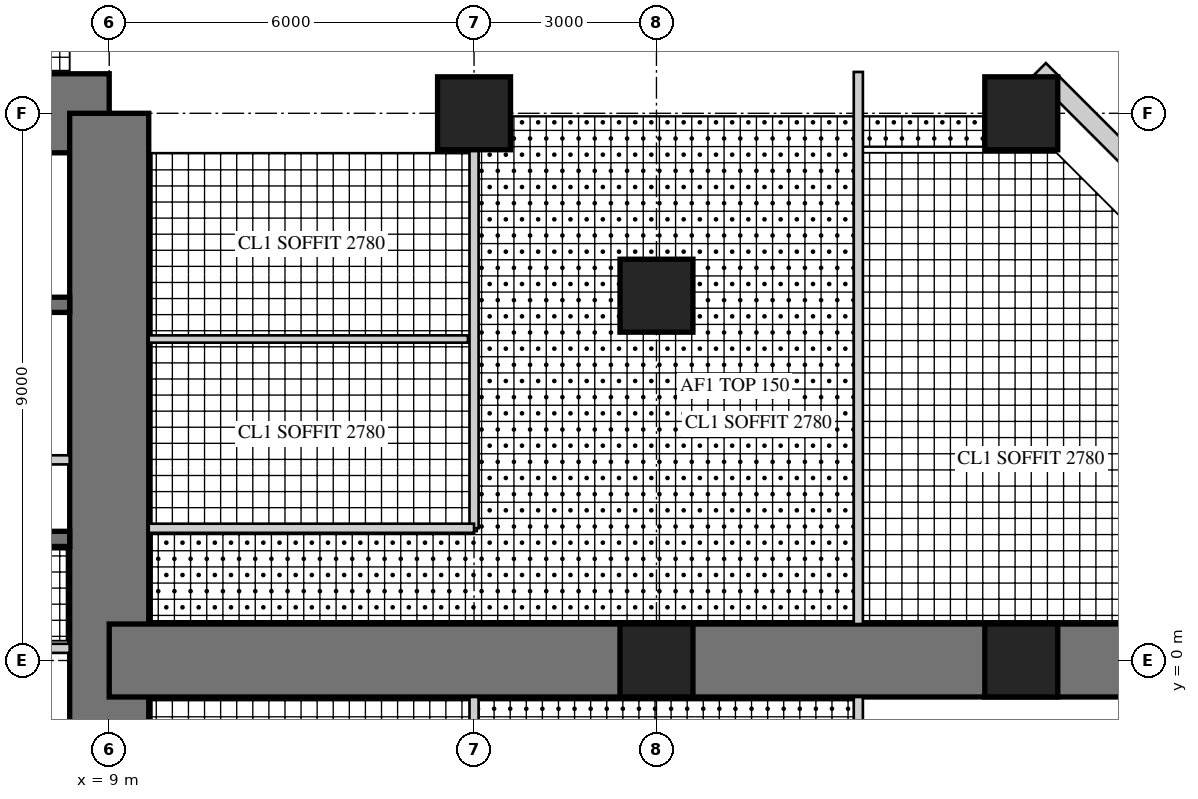
"""IFC4 building model, lengths in metres.
Left out: names, types, materials, properties, quantities, classifications, styles, units other than length and angle.
Written with IfcOpenShell. Run it as: python <this file> out.ifc"""

import sys

from ifc_helpers import new_model, si_unit, direction, frame, frame_2d, origin, origin_2d, place, context, subcontext, project, spatial, rectangle, extrude, element, fill, save


model = new_model("IFC4")
c1 = context("Model", 3, precision=1e-05, world=origin(), true_north=direction((0.0, 1.0)))
c2 = subcontext(c1, "Body", "Model", "MODEL_VIEW")
j1 = project(units=[si_unit("LENGTHUNIT", "METRE"), si_unit("PLANEANGLEUNIT", "RADIAN")], contexts=[c1])
p1 = place(None, origin())
s1 = spatial("IfcSite", under=j1, at=p1, CompositionType="ELEMENT")
p2 = place(p1, origin())
s2 = spatial("IfcBuilding", under=s1, at=p2, CompositionType="ELEMENT")
p3 = place(p2, frame((0.0, 0.0, 47.5)))
s3 = spatial("IfcBuildingStorey", under=s2, at=p3, CompositionType="ELEMENT", Elevation=47.5)
p4 = place(p3, frame((9.0, 9.0, 0.0), z_axis=(0.0, 0.0, 1.0), x_axis=(-1.0, 0.0, 0.0)))
e1 = element("IfcWall", 1, at=p4, inside=s3, PredefinedType="SHEAR", context=c2, shape_type="SweptSolid", body=[
    extrude(rectangle(XDim=18.0, YDim=1.3, at=frame_2d((9.0, 0.0))), origin(), (0.0, 0.0, 1.0), 4.0),
])
p5 = place(p4, frame((9.8, 0.0, 0.0)))
e2 = element("IfcOpeningElement", 2, at=p5, cuts=e1, PredefinedType="OPENING", context=c2, shape_type="SweptSolid", body=[
    extrude(rectangle(XDim=1.0, YDim=2.4, at=frame_2d((0.5, 1.2))), frame((0.0, 0.66, 0.0), z_axis=(0.0, -1.0, 0.0), x_axis=(1.0, 0.0, 0.0)), (0.0, 0.0, 1.0), 1.32),
])
p6 = place(p3, frame((9.0, -9.0, 0.0), z_axis=(0.0, 0.0, 1.0), x_axis=(0.0, 1.0, 0.0)))
e3 = element("IfcWall", 3, at=p6, inside=s3, PredefinedType="SHEAR", context=c2, shape_type="SweptSolid", body=[
    extrude(rectangle(XDim=18.0, YDim=1.3, at=frame_2d((9.0, 0.0))), origin(), (0.0, 0.0, 1.0), 4.0),
])
p7 = place(p6, frame((9.8, 0.0, 0.0)))
e4 = element("IfcOpeningElement", 4, at=p7, cuts=e3, PredefinedType="OPENING", context=c2, shape_type="SweptSolid", body=[
    extrude(rectangle(XDim=1.0, YDim=2.4, at=frame_2d((0.5, 1.2))), frame((0.0, 0.66, 0.0), z_axis=(0.0, -1.0, 0.0), x_axis=(1.0, 0.0, 0.0)), (0.0, 0.0, 1.0), 1.32),
])
p8 = place(p3, frame((1.925, 2.0, 0.0), z_axis=(0.0, 0.0, 1.0), x_axis=(1.0, 0.0, 0.0)))
e5 = element("IfcWall", 5, at=p8, inside=s3, PredefinedType="SHEAR", context=c2, shape_type="SweptSolid", body=[
    extrude(rectangle(XDim=6.425, YDim=0.25, at=frame_2d((3.212, 0.0))), origin(), (0.0, 0.0, 1.0), 4.0),
])
p9 = place(p3, frame((1.925, 5.85, 0.0), z_axis=(0.0, 0.0, 1.0), x_axis=(1.0, 0.0, 0.0)))
e6 = element("IfcWall", 6, at=p9, inside=s3, PredefinedType="SHEAR", context=c2, shape_type="SweptSolid", body=[
    extrude(rectangle(XDim=6.425, YDim=0.25, at=frame_2d((3.212, 0.0))), origin(), (0.0, 0.0, 1.0), 4.0),
])
p10 = place(p9, frame((0.454, 0.0, 0.0)))
e7 = element("IfcOpeningElement", 7, at=p10, cuts=e6, PredefinedType="OPENING", context=c2, shape_type="SweptSolid", body=[
    extrude(rectangle(XDim=1.1, YDim=2.2, at=frame_2d((0.55, 1.1))), frame((0.0, 0.135, 0.0), z_axis=(0.0, -1.0, 0.0), x_axis=(1.0, 0.0, 0.0)), (0.0, 0.0, 1.0), 0.27),
])
p11 = place(p9, frame((2.663, 0.0, 0.0)))
e8 = element("IfcOpeningElement", 8, at=p11, cuts=e6, PredefinedType="OPENING", context=c2, shape_type="SweptSolid", body=[
    extrude(rectangle(XDim=1.1, YDim=2.2, at=frame_2d((0.55, 1.1))), frame((0.0, 0.135, 0.0), z_axis=(0.0, -1.0, 0.0), x_axis=(1.0, 0.0, 0.0)), (0.0, 0.0, 1.0), 0.27),
])
p12 = place(p9, frame((4.871, 0.0, 0.0)))
e9 = element("IfcOpeningElement", 9, at=p12, cuts=e6, PredefinedType="OPENING", context=c2, shape_type="SweptSolid", body=[
    extrude(rectangle(XDim=1.1, YDim=2.2, at=frame_2d((0.55, 1.1))), frame((0.0, 0.135, 0.0), z_axis=(0.0, -1.0, 0.0), x_axis=(1.0, 0.0, 0.0)), (0.0, 0.0, 1.0), 0.27),
])
p13 = place(p3, frame((1.925, 3.3, 0.0), z_axis=(0.0, 0.0, 1.0), x_axis=(1.0, 0.0, 0.0)))
e10 = element("IfcWall", 10, at=p13, inside=s3, PredefinedType="PARTITIONING", context=c2, shape_type="SweptSolid", body=[
    extrude(rectangle(XDim=6.425, YDim=0.15, at=frame_2d((3.212, 0.0))), origin(), (0.0, 0.0, 1.0), 4.0),
])
p14 = place(p13, frame((0.075, 0.0, 0.0)))
e11 = element("IfcOpeningElement", 11, at=p14, cuts=e10, PredefinedType="OPENING", context=c2, shape_type="SweptSolid", body=[
    extrude(rectangle(XDim=0.8, YDim=2.1, at=frame_2d((0.4, 1.05))), frame((0.0, 0.085, 0.0), z_axis=(0.0, -1.0, 0.0), x_axis=(1.0, 0.0, 0.0)), (0.0, 0.0, 1.0), 0.17),
])
p15 = place(p13, frame((3.675, 0.0, 0.0)))
e12 = element("IfcOpeningElement", 12, at=p15, cuts=e10, PredefinedType="OPENING", context=c2, shape_type="SweptSolid", body=[
    extrude(rectangle(XDim=0.8, YDim=2.1, at=frame_2d((0.4, 1.05))), frame((0.0, 0.085, 0.0), z_axis=(0.0, -1.0, 0.0), x_axis=(1.0, 0.0, 0.0)), (0.0, 0.0, 1.0), 0.17),
])
p16 = place(p3, frame((9.0, 0.0, 0.0), z_axis=(0.0, 0.0, 1.0), x_axis=(1.0, 0.0, 0.0)))
e13 = element("IfcWall", 13, at=p16, inside=s3, PredefinedType="SHEAR", context=c2, shape_type="SweptSolid", body=[
    extrude(rectangle(XDim=18.0, YDim=1.2, at=frame_2d((9.0, 0.0))), origin(), (0.0, 0.0, 1.0), 4.0),
])
p17 = place(p16, frame((9.9, 0.0, 0.0)))
e14 = element("IfcOpeningElement", 14, at=p17, cuts=e13, PredefinedType="OPENING", context=c2, shape_type="SweptSolid", body=[
    extrude(rectangle(XDim=1.0, YDim=2.2, at=frame_2d((0.5, 1.1))), frame((0.0, 0.61, 0.0), z_axis=(0.0, -1.0, 0.0), x_axis=(1.0, 0.0, 0.0)), (0.0, 0.0, 1.0), 1.22),
])
for number, where, z_axis, x_axis in (
    (15, (15.0, 9.0, 0.0), (0.0, 0.0, 1.0), (1.0, 0.0, 0.0)),
    (16, (24.0, 9.0, 0.0), (0.0, 0.0, 1.0), (1.0, 0.0, 0.0)),
    (17, (18.0, 0.0, 0.0), (0.0, 0.0, 1.0), (1.0, 0.0, 0.0)),
    (18, (18.0, 6.0, 0.0), (0.0, 0.0, 1.0), (1.0, 0.0, 0.0)),
    (19, (24.0, 0.0, 0.0), (0.0, 0.0, 1.0), (1.0, 0.0, 0.0)),
):
    element("IfcColumn", number, at=place(p3, frame(where, z_axis=z_axis, x_axis=x_axis)), inside=s3, PredefinedType="COLUMN", context=c2, shape_type="SweptSolid", body=[
        extrude(rectangle(XDim=1.2, YDim=1.2, at=origin_2d()), origin(), (0.0, 0.0, 1.0), 4.0),
    ])
p18 = place(p3, frame((27.6, 6.418, 0.0), z_axis=(0.0, 0.0, 1.0), x_axis=(-0.707106781187, 0.707106781187, 0.0)))
e20 = element("IfcWall", 20, at=p18, inside=s3, PredefinedType="SOLIDWALL", context=c2, shape_type="SweptSolid", body=[
    extrude(rectangle(XDim=4.669, YDim=0.3, at=frame_2d((2.335, 0.0))), origin(), (0.0, 0.0, 1.0), 3.8),
])
p19 = place(p18, frame((1.885, 0.0, 0.3)))
e21 = element("IfcOpeningElement", 21, at=p19, cuts=e20, PredefinedType="OPENING", context=c2, shape_type="SweptSolid", body=[
    extrude(rectangle(XDim=0.9, YDim=2.4, at=frame_2d((0.45, 1.2))), frame((0.0, 0.16, 0.0), z_axis=(0.0, -1.0, 0.0), x_axis=(1.0, 0.0, 0.0)), (0.0, 0.0, 1.0), 0.32),
])
p20 = place(p3, frame((2.325, 0.2, 0.0), z_axis=(0.0, 0.0, 1.0), x_axis=(1.0, 0.0, 0.0)))
e22 = element("IfcWall", 22, at=p20, inside=s3, PredefinedType="PARTITIONING", context=c2, shape_type="SweptSolid", body=[
    extrude(rectangle(XDim=6.025, YDim=0.15, at=frame_2d((3.013, 0.0))), origin(), (0.0, 0.0, 1.0), 3.8),
])
p21 = place(p20, frame((0.4, 0.0, 0.0)))
e23 = element("IfcOpeningElement", 23, at=p21, cuts=e22, PredefinedType="OPENING", context=c2, shape_type="SweptSolid", body=[
    extrude(rectangle(XDim=1.0, YDim=2.1, at=frame_2d((0.5, 1.05))), frame((0.0, 0.085, 0.0), z_axis=(0.0, -1.0, 0.0), x_axis=(1.0, 0.0, 0.0)), (0.0, 0.0, 1.0), 0.17),
])
p22 = place(p3, frame((15.0, 2.175, 0.0), z_axis=(0.0, 0.0, 1.0), x_axis=(0.0, 1.0, 0.0)))
e24 = element("IfcWall", 24, at=p22, inside=s3, PredefinedType="PARTITIONING", context=c2, shape_type="SweptSolid", body=[
    extrude(rectangle(XDim=6.225, YDim=0.15, at=frame_2d((3.112, 0.0))), origin(), (0.0, 0.0, 1.0), 2.95),
])
p23 = place(p22, frame((1.056, 0.0, 0.0)))
e25 = element("IfcOpeningElement", 25, at=p23, cuts=e24, PredefinedType="OPENING", context=c2, shape_type="SweptSolid", body=[
    extrude(rectangle(XDim=1.0, YDim=2.1, at=frame_2d((0.5, 1.05))), frame((0.0, 0.085, 0.0), z_axis=(0.0, -1.0, 0.0), x_axis=(1.0, 0.0, 0.0)), (0.0, 0.0, 1.0), 0.17),
])
p24 = place(p22, frame((4.169, 0.0, 0.0)))
e26 = element("IfcOpeningElement", 26, at=p24, cuts=e24, PredefinedType="OPENING", context=c2, shape_type="SweptSolid", body=[
    extrude(rectangle(XDim=1.0, YDim=2.1, at=frame_2d((0.5, 1.05))), frame((0.0, 0.085, 0.0), z_axis=(0.0, -1.0, 0.0), x_axis=(1.0, 0.0, 0.0)), (0.0, 0.0, 1.0), 0.17),
])
p25 = place(p3, frame((9.65, 2.175, 0.0), z_axis=(0.0, 0.0, 1.0), x_axis=(1.0, 0.0, 0.0)))
e27 = element("IfcWall", 27, at=p25, inside=s3, PredefinedType="PARTITIONING", context=c2, shape_type="SweptSolid", body=[
    extrude(rectangle(XDim=5.35, YDim=0.15, at=frame_2d((2.675, 0.0))), origin(), (0.0, 0.0, 1.0), 3.8),
])
p26 = place(p3, frame((9.65, 5.288, 0.0), z_axis=(0.0, 0.0, 1.0), x_axis=(1.0, 0.0, 0.0)))
e28 = element("IfcWall", 28, at=p26, inside=s3, PredefinedType="PLUMBINGWALL", context=c2, shape_type="SweptSolid", body=[
    extrude(rectangle(XDim=5.25, YDim=0.12, at=frame_2d((2.625, 0.0))), origin(), (0.0, 0.0, 1.0), 3.8),
])
p27 = place(p3, frame((15.0, -8.4, 0.0), z_axis=(0.0, 0.0, 1.0), x_axis=(0.0, 1.0, 0.0)))
e29 = element("IfcWall", 29, at=p27, inside=s3, PredefinedType="PARTITIONING", context=c2, shape_type="SweptSolid", body=[
    extrude(rectangle(XDim=7.8, YDim=0.15, at=frame_2d((3.9, 0.0))), origin(), (0.0, 0.0, 1.0), 2.95),
])
p28 = place(p27, frame((3.4, 0.0, 0.0)))
e30 = element("IfcOpeningElement", 30, at=p28, cuts=e29, PredefinedType="OPENING", context=c2, shape_type="SweptSolid", body=[
    extrude(rectangle(XDim=1.0, YDim=2.1, at=frame_2d((0.5, 1.05))), frame((0.0, 0.085, 0.0), z_axis=(0.0, -1.0, 0.0), x_axis=(1.0, 0.0, 0.0)), (0.0, 0.0, 1.0), 0.17),
])
p29 = place(p3, frame((21.32, 0.6, 0.0), z_axis=(0.0, 0.0, 1.0), x_axis=(0.0, 1.0, 0.0)))
e31 = element("IfcWall", 31, at=p29, inside=s3, PredefinedType="PARTITIONING", context=c2, shape_type="SweptSolid", body=[
    extrude(rectangle(XDim=9.08, YDim=0.15, at=frame_2d((4.54, 0.0))), origin(), (0.0, 0.0, 1.0), 3.8),
])
p30 = place(p29, frame((0.45, 0.0, 0.0)))
e32 = element("IfcOpeningElement", 32, at=p30, cuts=e31, PredefinedType="OPENING", context=c2, shape_type="SweptSolid", body=[
    extrude(rectangle(XDim=1.0, YDim=2.2, at=frame_2d((0.5, 1.1))), frame((0.0, 0.085, 0.0), z_axis=(0.0, -1.0, 0.0), x_axis=(1.0, 0.0, 0.0)), (0.0, 0.0, 1.0), 0.17),
])
p31 = place(p3, frame((21.32, -9.68, 0.0), z_axis=(0.0, 0.0, 1.0), x_axis=(0.0, 1.0, 0.0)))
e33 = element("IfcWall", 33, at=p31, inside=s3, PredefinedType="PARTITIONING", context=c2, shape_type="SweptSolid", body=[
    extrude(rectangle(XDim=9.08, YDim=0.15, at=frame_2d((4.54, 0.0))), origin(), (0.0, 0.0, 1.0), 3.8),
])
p32 = place(p31, frame((5.087, 0.0, 0.0)))
e34 = element("IfcOpeningElement", 34, at=p32, cuts=e33, PredefinedType="OPENING", context=c2, shape_type="SweptSolid", body=[
    extrude(rectangle(XDim=1.0, YDim=2.2, at=frame_2d((0.5, 1.1))), frame((0.0, 0.085, 0.0), z_axis=(0.0, -1.0, 0.0), x_axis=(1.0, 0.0, 0.0)), (0.0, 0.0, 1.0), 0.17),
])
p33 = place(p31, frame((7.73, 0.0, 0.0)))
e35 = element("IfcOpeningElement", 35, at=p33, cuts=e33, PredefinedType="OPENING", context=c2, shape_type="SweptSolid", body=[
    extrude(rectangle(XDim=1.0, YDim=2.2, at=frame_2d((0.5, 1.1))), frame((0.0, 0.085, 0.0), z_axis=(0.0, -1.0, 0.0), x_axis=(1.0, 0.0, 0.0)), (0.0, 0.0, 1.0), 0.17),
])
p34 = place(p23, origin())
e36 = element("IfcDoor", 36, at=p34, inside=s3, OperationType="SINGLE_SWING_LEFT", PredefinedType="DOOR", context=c2, shape_type="SweptSolid", body=[
    extrude(rectangle(XDim=1.0, YDim=2.1, at=frame_2d((0.5, 1.05))), frame((0.0, 0.025, 0.0), z_axis=(0.0, -1.0, 0.0), x_axis=(1.0, 0.0, 0.0)), (0.0, 0.0, 1.0), 0.05),
])
fill(e25, e36)
p35 = place(p24, origin())
e37 = element("IfcDoor", 37, at=p35, inside=s3, OperationType="SINGLE_SWING_LEFT", PredefinedType="DOOR", context=c2, shape_type="SweptSolid", body=[
    extrude(rectangle(XDim=1.0, YDim=2.1, at=frame_2d((0.5, 1.05))), frame((0.0, 0.025, 0.0), z_axis=(0.0, -1.0, 0.0), x_axis=(1.0, 0.0, 0.0)), (0.0, 0.0, 1.0), 0.05),
])
fill(e26, e37)
p36 = place(p30, frame((1.0, 0.0, 0.0), z_axis=(0.0, 0.0, 1.0), x_axis=(-1.0, 0.0, 0.0)))
e38 = element("IfcDoor", 38, at=p36, inside=s3, OperationType="SINGLE_SWING_RIGHT", PredefinedType="DOOR", context=c2, shape_type="SweptSolid", body=[
    extrude(rectangle(XDim=1.0, YDim=2.2, at=frame_2d((0.5, 1.1))), frame((0.0, 0.025, 0.0), z_axis=(0.0, -1.0, 0.0), x_axis=(1.0, 0.0, 0.0)), (0.0, 0.0, 1.0), 0.05),
])
fill(e32, e38)
p37 = place(p33, frame((1.0, 0.0, 0.0), z_axis=(0.0, 0.0, 1.0), x_axis=(-1.0, 0.0, 0.0)))
e39 = element("IfcDoor", 39, at=p37, inside=s3, OperationType="SINGLE_SWING_LEFT", PredefinedType="DOOR", context=c2, shape_type="SweptSolid", body=[
    extrude(rectangle(XDim=1.0, YDim=2.2, at=frame_2d((0.5, 1.1))), frame((0.0, 0.025, 0.0), z_axis=(0.0, -1.0, 0.0), x_axis=(1.0, 0.0, 0.0)), (0.0, 0.0, 1.0), 0.05),
])
fill(e35, e39)
p38 = place(p17, frame((1.0, 0.0, 0.0), z_axis=(0.0, 0.0, 1.0), x_axis=(-1.0, 0.0, 0.0)))
e40 = element("IfcDoor", 40, at=p38, inside=s3, OperationType="SINGLE_SWING_LEFT", PredefinedType="DOOR", context=c2, shape_type="SweptSolid", body=[
    extrude(rectangle(XDim=1.0, YDim=2.2, at=frame_2d((0.5, 1.1))), frame((0.0, 0.025, 0.0), z_axis=(0.0, -1.0, 0.0), x_axis=(1.0, 0.0, 0.0)), (0.0, 0.0, 1.0), 0.05),
])
fill(e14, e40)
p39 = place(p7, frame((1.0, 0.0, 0.0), z_axis=(0.0, 0.0, 1.0), x_axis=(-1.0, 0.0, 0.0)))
e41 = element("IfcDoor", 41, at=p39, inside=s3, OperationType="SINGLE_SWING_RIGHT", PredefinedType="DOOR", context=c2, shape_type="SweptSolid", body=[
    extrude(rectangle(XDim=1.0, YDim=2.4, at=frame_2d((0.5, 1.2))), frame((0.0, -0.005, 0.0), z_axis=(0.0, -1.0, 0.0), x_axis=(1.0, 0.0, 0.0)), (0.0, 0.0, 1.0), 0.05),
])
fill(e4, e41)
save(model, sys.argv[1])
